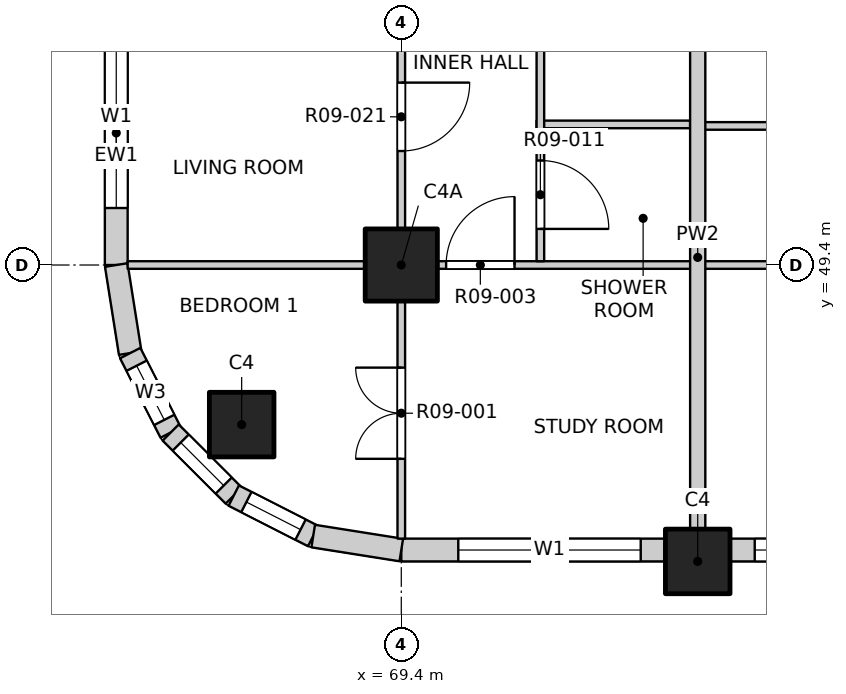
"""IFC4 building model, lengths in metres.
Left out: names, types, materials, properties, quantities, classifications, styles, units other than length and angle.
Written with IfcOpenShell. Run it as: python <this file> out.ifc"""

import sys

from ifc_helpers import new_model, si_unit, direction, frame, frame_2d, origin, origin_2d, place, context, subcontext, project, spatial, rectangle, extrude, element, fill, save


model = new_model("IFC4")
c1 = context("Model", 3, precision=1e-05, world=origin(), true_north=direction((0.0, 1.0)))
c2 = subcontext(c1, "Body", "Model", "MODEL_VIEW")
j1 = project(units=[si_unit("LENGTHUNIT", "METRE"), si_unit("PLANEANGLEUNIT", "RADIAN")], contexts=[c1])
p1 = place(None, origin())
s1 = spatial("IfcSite", under=j1, at=p1, CompositionType="ELEMENT")
p2 = place(p1, origin())
s2 = spatial("IfcBuilding", under=s1, at=p2, CompositionType="ELEMENT")
p3 = place(p2, frame((0.0, 0.0, 110.1)))
s3 = spatial("IfcBuildingStorey", under=s2, at=p3, CompositionType="ELEMENT", Elevation=110.1)
for number, where, z_axis, x_axis in (
    (1, (67.3, 47.3, -0.25), (0.0, 0.0, 1.0), (1.0, 0.0, 0.0)),
    (2, (73.3, 45.5, -0.25), (0.0, 0.0, 1.0), (1.0, 0.0, 0.0)),
):
    element("IfcColumn", number, at=place(p3, frame(where, z_axis=z_axis, x_axis=x_axis)), inside=s3, PredefinedType="COLUMN", context=c2, shape_type="SweptSolid", body=[
        extrude(rectangle(XDim=0.85, YDim=0.85, at=origin_2d()), origin(), (0.0, 0.0, 1.0), 3.4),
    ])
p4 = place(p3, frame((69.4, 49.4, -0.25), z_axis=(0.0, 0.0, 1.0), x_axis=(1.0, 0.0, 0.0)))
e3 = element("IfcColumn", 3, at=p4, inside=s3, PredefinedType="COLUMN", context=c2, shape_type="SweptSolid", body=[
    extrude(rectangle(XDim=0.95, YDim=0.95, at=origin_2d()), origin(), (0.0, 0.0, 1.0), 3.4),
])
p5 = place(p3, frame((69.4, 45.65, 0.0), z_axis=(0.0, 0.0, 1.0), x_axis=(1.0, 0.0, 0.0)))
e4 = element("IfcWall", 4, at=p5, inside=s3, PredefinedType="SOLIDWALL", context=c2, shape_type="SweptSolid", body=[
    extrude(rectangle(XDim=3.475, YDim=0.3, at=frame_2d((1.738, 0.0))), origin(), (0.0, 0.0, 1.0), 2.7),
])
p6 = place(p5, frame((0.75, 0.0, 0.9)))
e5 = element("IfcOpeningElement", 5, at=p6, cuts=e4, PredefinedType="OPENING", context=c2, shape_type="SweptSolid", body=[
    extrude(rectangle(XDim=2.4, YDim=1.8, at=frame_2d((1.2, 0.9))), frame((0.0, 0.16, 0.0), z_axis=(0.0, -1.0, 0.0), x_axis=(1.0, 0.0, 0.0)), (0.0, 0.0, 1.0), 0.32),
])
p7 = place(p3, frame((73.725, 45.65, 0.0), z_axis=(0.0, 0.0, 1.0), x_axis=(1.0, 0.0, 0.0)))
e6 = element("IfcWall", 6, at=p7, inside=s3, PredefinedType="SOLIDWALL", context=c2, shape_type="SweptSolid", body=[
    extrude(rectangle(XDim=6.95, YDim=0.3, at=frame_2d((3.475, 0.0))), origin(), (0.0, 0.0, 1.0), 2.7),
])
p8 = place(p7, frame((0.325, 0.0, 0.9)))
e7 = element("IfcOpeningElement", 7, at=p8, cuts=e6, PredefinedType="OPENING", context=c2, shape_type="SweptSolid", body=[
    extrude(rectangle(XDim=2.4, YDim=1.8, at=frame_2d((1.2, 0.9))), frame((0.0, 0.16, 0.0), z_axis=(0.0, -1.0, 0.0), x_axis=(1.0, 0.0, 0.0)), (0.0, 0.0, 1.0), 0.32),
])
p9 = place(p7, frame((4.225, 0.0, 0.9)))
e8 = element("IfcOpeningElement", 8, at=p9, cuts=e6, PredefinedType="OPENING", context=c2, shape_type="SweptSolid", body=[
    extrude(rectangle(XDim=2.4, YDim=1.8, at=frame_2d((1.2, 0.9))), frame((0.0, 0.16, 0.0), z_axis=(0.0, -1.0, 0.0), x_axis=(1.0, 0.0, 0.0)), (0.0, 0.0, 1.0), 0.32),
])
p10 = place(p3, frame((65.65, 49.4, 0.0), z_axis=(0.0, 0.0, 1.0), x_axis=(0.0, 1.0, 0.0)))
e9 = element("IfcWall", 9, at=p10, inside=s3, PredefinedType="SOLIDWALL", context=c2, shape_type="SweptSolid", body=[
    extrude(rectangle(XDim=3.475, YDim=0.3, at=frame_2d((1.738, 0.0))), origin(), (0.0, 0.0, 1.0), 2.7),
])
p11 = place(p10, frame((0.75, 0.0, 0.9)))
e10 = element("IfcOpeningElement", 10, at=p11, cuts=e9, PredefinedType="OPENING", context=c2, shape_type="SweptSolid", body=[
    extrude(rectangle(XDim=2.4, YDim=1.8, at=frame_2d((1.2, 0.9))), frame((0.0, 0.16, 0.0), z_axis=(0.0, -1.0, 0.0), x_axis=(1.0, 0.0, 0.0)), (0.0, 0.0, 1.0), 0.32),
])
p12 = place(p3, frame((65.65, 49.4, 0.0), z_axis=(0.0, 0.0, 1.0), x_axis=(0.156496880861, -0.987678452879, 0.0)))
e11 = element("IfcWall", 11, at=p12, inside=s3, PredefinedType="SOLIDWALL", context=c2, shape_type="SweptSolid", body=[
    extrude(rectangle(XDim=1.173, YDim=0.3, at=frame_2d((0.586, 0.0))), origin(), (0.0, 0.0, 1.0), 2.7),
])
p13 = place(p3, frame((65.833, 48.241, 0.0), z_axis=(0.0, 0.0, 1.0), x_axis=(0.454025524128, -0.890988677504, 0.0)))
e12 = element("IfcWall", 12, at=p13, inside=s3, PredefinedType="SOLIDWALL", context=c2, shape_type="SweptSolid", body=[
    extrude(rectangle(XDim=1.173, YDim=0.3, at=frame_2d((0.587, 0.0))), origin(), (0.0, 0.0, 1.0), 2.7),
])
p14 = place(p13, frame((0.187, 0.0, 0.9)))
e13 = element("IfcOpeningElement", 13, at=p14, cuts=e12, PredefinedType="OPENING", context=c2, shape_type="SweptSolid", body=[
    extrude(rectangle(XDim=0.8, YDim=1.2, at=frame_2d((0.4, 0.6))), frame((0.0, 0.16, 0.0), z_axis=(0.0, -1.0, 0.0), x_axis=(1.0, 0.0, 0.0)), (0.0, 0.0, 1.0), 0.32),
])
p15 = place(p3, frame((66.366, 47.196, 0.0), z_axis=(0.0, 0.0, 1.0), x_axis=(0.707106781187, -0.707106781187, 0.0)))
e14 = element("IfcWall", 14, at=p15, inside=s3, PredefinedType="SOLIDWALL", context=c2, shape_type="SweptSolid", body=[
    extrude(rectangle(XDim=1.173, YDim=0.3, at=frame_2d((0.586, 0.0))), origin(), (0.0, 0.0, 1.0), 2.7),
])
p16 = place(p15, frame((0.187, 0.0, 0.9)))
e15 = element("IfcOpeningElement", 15, at=p16, cuts=e14, PredefinedType="OPENING", context=c2, shape_type="SweptSolid", body=[
    extrude(rectangle(XDim=0.8, YDim=1.2, at=frame_2d((0.4, 0.6))), frame((0.0, 0.16, 0.0), z_axis=(0.0, -1.0, 0.0), x_axis=(1.0, 0.0, 0.0)), (0.0, 0.0, 1.0), 0.32),
])
p17 = place(p3, frame((67.196, 46.366, 0.0), z_axis=(0.0, 0.0, 1.0), x_axis=(0.890988677504, -0.454025524128, 0.0)))
e16 = element("IfcWall", 16, at=p17, inside=s3, PredefinedType="SOLIDWALL", context=c2, shape_type="SweptSolid", body=[
    extrude(rectangle(XDim=1.173, YDim=0.3, at=frame_2d((0.587, 0.0))), origin(), (0.0, 0.0, 1.0), 2.7),
])
p18 = place(p17, frame((0.187, 0.0, 0.9)))
e17 = element("IfcOpeningElement", 17, at=p18, cuts=e16, PredefinedType="OPENING", context=c2, shape_type="SweptSolid", body=[
    extrude(rectangle(XDim=0.8, YDim=1.2, at=frame_2d((0.4, 0.6))), frame((0.0, 0.16, 0.0), z_axis=(0.0, -1.0, 0.0), x_axis=(1.0, 0.0, 0.0)), (0.0, 0.0, 1.0), 0.32),
])
p19 = place(p3, frame((68.241, 45.833, 0.0), z_axis=(0.0, 0.0, 1.0), x_axis=(0.987678452879, -0.156496880861, 0.0)))
e18 = element("IfcWall", 18, at=p19, inside=s3, PredefinedType="SOLIDWALL", context=c2, shape_type="SweptSolid", body=[
    extrude(rectangle(XDim=1.173, YDim=0.3, at=frame_2d((0.586, 0.0))), origin(), (0.0, 0.0, 1.0), 2.7),
])
p20 = place(p3, frame((65.8, 49.4, 0.0), z_axis=(0.0, 0.0, 1.0), x_axis=(1.0, 0.0, 0.0)))
e19 = element("IfcWall", 19, at=p20, inside=s3, PredefinedType="PARTITIONING", context=c2, shape_type="SweptSolid", body=[
    extrude(rectangle(XDim=38.4, YDim=0.1, at=frame_2d((19.2, 0.0))), origin(), (0.0, 0.0, 1.0), 3.15),
])
p21 = place(p20, frame((4.19, 0.0, 0.0)))
e20 = element("IfcOpeningElement", 20, at=p21, cuts=e19, PredefinedType="OPENING", context=c2, shape_type="SweptSolid", body=[
    extrude(rectangle(XDim=0.9, YDim=2.1, at=frame_2d((0.45, 1.05))), frame((0.0, 0.06, 0.0), z_axis=(0.0, -1.0, 0.0), x_axis=(1.0, 0.0, 0.0)), (0.0, 0.0, 1.0), 0.12),
])
p22 = place(p20, frame((9.0, 0.0, 0.0)))
e21 = element("IfcOpeningElement", 21, at=p22, cuts=e19, PredefinedType="OPENING", context=c2, shape_type="SweptSolid", body=[
    extrude(rectangle(XDim=0.9, YDim=2.1, at=frame_2d((0.45, 1.05))), frame((0.0, 0.06, 0.0), z_axis=(0.0, -1.0, 0.0), x_axis=(1.0, 0.0, 0.0)), (0.0, 0.0, 1.0), 0.12),
])
p23 = place(p20, frame((12.9, 0.0, 0.0)))
e22 = element("IfcOpeningElement", 22, at=p23, cuts=e19, PredefinedType="OPENING", context=c2, shape_type="SweptSolid", body=[
    extrude(rectangle(XDim=0.9, YDim=2.1, at=frame_2d((0.45, 1.05))), frame((0.0, 0.06, 0.0), z_axis=(0.0, -1.0, 0.0), x_axis=(1.0, 0.0, 0.0)), (0.0, 0.0, 1.0), 0.12),
])
p24 = place(p20, frame((16.8, 0.0, 0.0)))
e23 = element("IfcOpeningElement", 23, at=p24, cuts=e19, PredefinedType="OPENING", context=c2, shape_type="SweptSolid", body=[
    extrude(rectangle(XDim=0.9, YDim=2.1, at=frame_2d((0.45, 1.05))), frame((0.0, 0.06, 0.0), z_axis=(0.0, -1.0, 0.0), x_axis=(1.0, 0.0, 0.0)), (0.0, 0.0, 1.0), 0.12),
])
p25 = place(p20, frame((20.7, 0.0, 0.0)))
e24 = element("IfcOpeningElement", 24, at=p25, cuts=e19, PredefinedType="OPENING", context=c2, shape_type="SweptSolid", body=[
    extrude(rectangle(XDim=0.9, YDim=2.1, at=frame_2d((0.45, 1.05))), frame((0.0, 0.06, 0.0), z_axis=(0.0, -1.0, 0.0), x_axis=(1.0, 0.0, 0.0)), (0.0, 0.0, 1.0), 0.12),
])
p26 = place(p20, frame((24.6, 0.0, 0.0)))
e25 = element("IfcOpeningElement", 25, at=p26, cuts=e19, PredefinedType="OPENING", context=c2, shape_type="SweptSolid", body=[
    extrude(rectangle(XDim=0.9, YDim=2.1, at=frame_2d((0.45, 1.05))), frame((0.0, 0.06, 0.0), z_axis=(0.0, -1.0, 0.0), x_axis=(1.0, 0.0, 0.0)), (0.0, 0.0, 1.0), 0.12),
])
p27 = place(p20, frame((28.5, 0.0, 0.0)))
e26 = element("IfcOpeningElement", 26, at=p27, cuts=e19, PredefinedType="OPENING", context=c2, shape_type="SweptSolid", body=[
    extrude(rectangle(XDim=0.9, YDim=2.1, at=frame_2d((0.45, 1.05))), frame((0.0, 0.06, 0.0), z_axis=(0.0, -1.0, 0.0), x_axis=(1.0, 0.0, 0.0)), (0.0, 0.0, 1.0), 0.12),
])
p28 = place(p20, frame((33.31, 0.0, 0.0)))
e27 = element("IfcOpeningElement", 27, at=p28, cuts=e19, PredefinedType="OPENING", context=c2, shape_type="SweptSolid", body=[
    extrude(rectangle(XDim=0.9, YDim=2.1, at=frame_2d((0.45, 1.05))), frame((0.0, 0.06, 0.0), z_axis=(0.0, -1.0, 0.0), x_axis=(1.0, 0.0, 0.0)), (0.0, 0.0, 1.0), 0.12),
])
p29 = place(p3, frame((73.2, 51.23, 0.0), z_axis=(0.0, 0.0, 1.0), x_axis=(1.0, 0.0, 0.0)))
e28 = element("IfcWall", 28, at=p29, inside=s3, PredefinedType="PARTITIONING", context=c2, shape_type="SweptSolid", body=[
    extrude(rectangle(XDim=9.15, YDim=0.1, at=frame_2d((4.575, 0.0))), origin(), (0.0, 0.0, 1.0), 3.15),
])
p30 = place(p29, frame((1.41, 0.0, 0.0)))
e29 = element("IfcOpeningElement", 29, at=p30, cuts=e28, PredefinedType="OPENING", context=c2, shape_type="SweptSolid", body=[
    extrude(rectangle(XDim=0.9, YDim=2.1, at=frame_2d((0.45, 1.05))), frame((0.0, 0.06, 0.0), z_axis=(0.0, -1.0, 0.0), x_axis=(1.0, 0.0, 0.0)), (0.0, 0.0, 1.0), 0.12),
])
p31 = place(p29, frame((4.76, 0.0, 0.0)))
e30 = element("IfcOpeningElement", 30, at=p31, cuts=e28, PredefinedType="OPENING", context=c2, shape_type="SweptSolid", body=[
    extrude(rectangle(XDim=0.8, YDim=2.1, at=frame_2d((0.4, 1.05))), frame((0.0, 0.06, 0.0), z_axis=(0.0, -1.0, 0.0), x_axis=(1.0, 0.0, 0.0)), (0.0, 0.0, 1.0), 0.12),
])
p32 = place(p29, frame((7.45, 0.0, 0.0)))
e31 = element("IfcOpeningElement", 31, at=p32, cuts=e28, PredefinedType="OPENING", context=c2, shape_type="SweptSolid", body=[
    extrude(rectangle(XDim=0.9, YDim=2.1, at=frame_2d((0.45, 1.05))), frame((0.0, 0.06, 0.0), z_axis=(0.0, -1.0, 0.0), x_axis=(1.0, 0.0, 0.0)), (0.0, 0.0, 1.0), 0.12),
])
p33 = place(p3, frame((71.18, 51.25, 0.0), z_axis=(0.0, 0.0, 1.0), x_axis=(1.0, 0.0, 0.0)))
e32 = element("IfcWall", 32, at=p33, inside=s3, PredefinedType="PARTITIONING", context=c2, shape_type="SweptSolid", body=[
    extrude(rectangle(XDim=2.02, YDim=0.1, at=frame_2d((1.01, 0.0))), origin(), (0.0, 0.0, 1.0), 3.15),
])
p34 = place(p3, frame((69.4, 45.8, 0.0), z_axis=(0.0, 0.0, 1.0), x_axis=(0.0, 1.0, 0.0)))
e33 = element("IfcWall", 33, at=p34, inside=s3, PredefinedType="PARTITIONING", context=c2, shape_type="SweptSolid", body=[
    extrude(rectangle(XDim=38.4, YDim=0.1, at=frame_2d((19.2, 0.0))), origin(), (0.0, 0.0, 1.0), 3.15),
])
p35 = place(p34, frame((1.05, 0.0, 0.0)))
e34 = element("IfcOpeningElement", 34, at=p35, cuts=e33, PredefinedType="OPENING", context=c2, shape_type="SweptSolid", body=[
    extrude(rectangle(XDim=1.2, YDim=2.1, at=frame_2d((0.6, 1.05))), frame((0.0, 0.06, 0.0), z_axis=(0.0, -1.0, 0.0), x_axis=(1.0, 0.0, 0.0)), (0.0, 0.0, 1.0), 0.12),
])
p36 = place(p34, frame((5.1, 0.0, 0.0)))
e35 = element("IfcOpeningElement", 35, at=p36, cuts=e33, PredefinedType="OPENING", context=c2, shape_type="SweptSolid", body=[
    extrude(rectangle(XDim=0.9, YDim=2.1, at=frame_2d((0.45, 1.05))), frame((0.0, 0.06, 0.0), z_axis=(0.0, -1.0, 0.0), x_axis=(1.0, 0.0, 0.0)), (0.0, 0.0, 1.0), 0.12),
])
p37 = place(p34, frame((9.0, 0.0, 0.0)))
e36 = element("IfcOpeningElement", 36, at=p37, cuts=e33, PredefinedType="OPENING", context=c2, shape_type="SweptSolid", body=[
    extrude(rectangle(XDim=0.9, YDim=2.1, at=frame_2d((0.45, 1.05))), frame((0.0, 0.06, 0.0), z_axis=(0.0, -1.0, 0.0), x_axis=(1.0, 0.0, 0.0)), (0.0, 0.0, 1.0), 0.12),
])
p38 = place(p34, frame((12.9, 0.0, 0.0)))
e37 = element("IfcOpeningElement", 37, at=p38, cuts=e33, PredefinedType="OPENING", context=c2, shape_type="SweptSolid", body=[
    extrude(rectangle(XDim=0.9, YDim=2.1, at=frame_2d((0.45, 1.05))), frame((0.0, 0.06, 0.0), z_axis=(0.0, -1.0, 0.0), x_axis=(1.0, 0.0, 0.0)), (0.0, 0.0, 1.0), 0.12),
])
p39 = place(p34, frame((16.8, 0.0, 0.0)))
e38 = element("IfcOpeningElement", 38, at=p39, cuts=e33, PredefinedType="OPENING", context=c2, shape_type="SweptSolid", body=[
    extrude(rectangle(XDim=0.9, YDim=2.1, at=frame_2d((0.45, 1.05))), frame((0.0, 0.06, 0.0), z_axis=(0.0, -1.0, 0.0), x_axis=(1.0, 0.0, 0.0)), (0.0, 0.0, 1.0), 0.12),
])
p40 = place(p34, frame((20.7, 0.0, 0.0)))
e39 = element("IfcOpeningElement", 39, at=p40, cuts=e33, PredefinedType="OPENING", context=c2, shape_type="SweptSolid", body=[
    extrude(rectangle(XDim=0.9, YDim=2.1, at=frame_2d((0.45, 1.05))), frame((0.0, 0.06, 0.0), z_axis=(0.0, -1.0, 0.0), x_axis=(1.0, 0.0, 0.0)), (0.0, 0.0, 1.0), 0.12),
])
p41 = place(p34, frame((24.6, 0.0, 0.0)))
e40 = element("IfcOpeningElement", 40, at=p41, cuts=e33, PredefinedType="OPENING", context=c2, shape_type="SweptSolid", body=[
    extrude(rectangle(XDim=0.9, YDim=2.1, at=frame_2d((0.45, 1.05))), frame((0.0, 0.06, 0.0), z_axis=(0.0, -1.0, 0.0), x_axis=(1.0, 0.0, 0.0)), (0.0, 0.0, 1.0), 0.12),
])
p42 = place(p34, frame((28.5, 0.0, 0.0)))
e41 = element("IfcOpeningElement", 41, at=p42, cuts=e33, PredefinedType="OPENING", context=c2, shape_type="SweptSolid", body=[
    extrude(rectangle(XDim=0.9, YDim=2.1, at=frame_2d((0.45, 1.05))), frame((0.0, 0.06, 0.0), z_axis=(0.0, -1.0, 0.0), x_axis=(1.0, 0.0, 0.0)), (0.0, 0.0, 1.0), 0.12),
])
p43 = place(p34, frame((32.4, 0.0, 0.0)))
e42 = element("IfcOpeningElement", 42, at=p43, cuts=e33, PredefinedType="OPENING", context=c2, shape_type="SweptSolid", body=[
    extrude(rectangle(XDim=0.9, YDim=2.1, at=frame_2d((0.45, 1.05))), frame((0.0, 0.06, 0.0), z_axis=(0.0, -1.0, 0.0), x_axis=(1.0, 0.0, 0.0)), (0.0, 0.0, 1.0), 0.12),
])
p44 = place(p34, frame((36.15, 0.0, 0.0)))
e43 = element("IfcOpeningElement", 43, at=p44, cuts=e33, PredefinedType="OPENING", context=c2, shape_type="SweptSolid", body=[
    extrude(rectangle(XDim=1.2, YDim=2.1, at=frame_2d((0.6, 1.05))), frame((0.0, 0.06, 0.0), z_axis=(0.0, -1.0, 0.0), x_axis=(1.0, 0.0, 0.0)), (0.0, 0.0, 1.0), 0.12),
])
p45 = place(p3, frame((71.23, 49.45, 0.0), z_axis=(0.0, 0.0, 1.0), x_axis=(0.0, 1.0, 0.0)))
e44 = element("IfcWall", 44, at=p45, inside=s3, PredefinedType="PARTITIONING", context=c2, shape_type="SweptSolid", body=[
    extrude(rectangle(XDim=4.65, YDim=0.1, at=frame_2d((2.325, 0.0))), origin(), (0.0, 0.0, 1.0), 3.15),
])
p46 = place(p45, frame((0.425, 0.0, 0.0)))
e45 = element("IfcOpeningElement", 45, at=p46, cuts=e44, PredefinedType="OPENING", context=c2, shape_type="SweptSolid", body=[
    extrude(rectangle(XDim=0.9, YDim=2.1, at=frame_2d((0.45, 1.05))), frame((0.0, 0.06, 0.0), z_axis=(0.0, -1.0, 0.0), x_axis=(1.0, 0.0, 0.0)), (0.0, 0.0, 1.0), 0.12),
])
p47 = place(p45, frame((2.85, 0.0, 0.0)))
e46 = element("IfcOpeningElement", 46, at=p47, cuts=e44, PredefinedType="OPENING", context=c2, shape_type="SweptSolid", body=[
    extrude(rectangle(XDim=0.8, YDim=2.1, at=frame_2d((0.4, 1.05))), frame((0.0, 0.06, 0.0), z_axis=(0.0, -1.0, 0.0), x_axis=(1.0, 0.0, 0.0)), (0.0, 0.0, 1.0), 0.12),
])
p48 = place(p3, frame((73.3, 45.8, 0.0), z_axis=(0.0, 0.0, 1.0), x_axis=(0.0, 1.0, 0.0)))
e47 = element("IfcWall", 47, at=p48, inside=s3, PredefinedType="PARTITIONING", context=c2, shape_type="SweptSolid", body=[
    extrude(rectangle(XDim=7.4, YDim=0.2, at=frame_2d((3.7, 0.0))), origin(), (0.0, 0.0, 1.0), 3.15),
])
p49 = place(p6, origin())
e48 = element("IfcWindow", 48, at=p49, inside=s3, PartitioningType="DOUBLE_PANEL_VERTICAL", PredefinedType="WINDOW", context=c2, shape_type="SweptSolid", body=[
    extrude(rectangle(XDim=2.4, YDim=1.8, at=frame_2d((1.2, 0.9))), frame((0.0, 0.03, 0.0), z_axis=(0.0, -1.0, 0.0), x_axis=(1.0, 0.0, 0.0)), (0.0, 0.0, 1.0), 0.06),
])
fill(e5, e48)
p50 = place(p8, origin())
e49 = element("IfcWindow", 49, at=p50, inside=s3, PartitioningType="DOUBLE_PANEL_VERTICAL", PredefinedType="WINDOW", context=c2, shape_type="SweptSolid", body=[
    extrude(rectangle(XDim=2.4, YDim=1.8, at=frame_2d((1.2, 0.9))), frame((0.0, 0.03, 0.0), z_axis=(0.0, -1.0, 0.0), x_axis=(1.0, 0.0, 0.0)), (0.0, 0.0, 1.0), 0.06),
])
fill(e7, e49)
p51 = place(p11, origin())
e50 = element("IfcWindow", 50, at=p51, inside=s3, PartitioningType="DOUBLE_PANEL_VERTICAL", PredefinedType="WINDOW", context=c2, shape_type="SweptSolid", body=[
    extrude(rectangle(XDim=2.4, YDim=1.8, at=frame_2d((1.2, 0.9))), frame((0.0, 0.03, 0.0), z_axis=(0.0, -1.0, 0.0), x_axis=(1.0, 0.0, 0.0)), (0.0, 0.0, 1.0), 0.06),
])
fill(e10, e50)
p52 = place(p14, origin())
e51 = element("IfcWindow", 51, at=p52, inside=s3, PartitioningType="SINGLE_PANEL", PredefinedType="WINDOW", context=c2, shape_type="SweptSolid", body=[
    extrude(rectangle(XDim=0.8, YDim=1.2, at=frame_2d((0.4, 0.6))), frame((0.0, 0.03, 0.0), z_axis=(0.0, -1.0, 0.0), x_axis=(1.0, 0.0, 0.0)), (0.0, 0.0, 1.0), 0.06),
])
fill(e13, e51)
p53 = place(p16, origin())
e52 = element("IfcWindow", 52, at=p53, inside=s3, PartitioningType="SINGLE_PANEL", PredefinedType="WINDOW", context=c2, shape_type="SweptSolid", body=[
    extrude(rectangle(XDim=0.8, YDim=1.2, at=frame_2d((0.4, 0.6))), frame((0.0, 0.03, 0.0), z_axis=(0.0, -1.0, 0.0), x_axis=(1.0, 0.0, 0.0)), (0.0, 0.0, 1.0), 0.06),
])
fill(e15, e52)
p54 = place(p18, origin())
e53 = element("IfcWindow", 53, at=p54, inside=s3, PartitioningType="SINGLE_PANEL", PredefinedType="WINDOW", context=c2, shape_type="SweptSolid", body=[
    extrude(rectangle(XDim=0.8, YDim=1.2, at=frame_2d((0.4, 0.6))), frame((0.0, 0.03, 0.0), z_axis=(0.0, -1.0, 0.0), x_axis=(1.0, 0.0, 0.0)), (0.0, 0.0, 1.0), 0.06),
])
fill(e17, e53)
p55 = place(p35, origin())
e54 = element("IfcDoor", 54, at=p55, inside=s3, OperationType="DOUBLE_DOOR_SINGLE_SWING", PredefinedType="DOOR", context=c2, shape_type="SweptSolid", body=[
    extrude(rectangle(XDim=1.2, YDim=2.1, at=frame_2d((0.6, 1.05))), frame((0.0, 0.025, 0.0), z_axis=(0.0, -1.0, 0.0), x_axis=(1.0, 0.0, 0.0)), (0.0, 0.0, 1.0), 0.05),
])
fill(e34, e54)
p56 = place(p21, origin())
e55 = element("IfcDoor", 55, at=p56, inside=s3, OperationType="SINGLE_SWING_RIGHT", PredefinedType="DOOR", context=c2, shape_type="SweptSolid", body=[
    extrude(rectangle(XDim=0.9, YDim=2.1, at=frame_2d((0.45, 1.05))), frame((0.0, 0.025, 0.0), z_axis=(0.0, -1.0, 0.0), x_axis=(1.0, 0.0, 0.0)), (0.0, 0.0, 1.0), 0.05),
])
fill(e20, e55)
p57 = place(p46, origin())
e56 = element("IfcDoor", 56, at=p57, inside=s3, OperationType="SINGLE_SWING_RIGHT", PredefinedType="DOOR", context=c2, shape_type="SweptSolid", body=[
    extrude(rectangle(XDim=0.9, YDim=2.1, at=frame_2d((0.45, 1.05))), frame((0.0, 0.025, 0.0), z_axis=(0.0, -1.0, 0.0), x_axis=(1.0, 0.0, 0.0)), (0.0, 0.0, 1.0), 0.05),
])
fill(e45, e56)
p58 = place(p36, origin())
e57 = element("IfcDoor", 57, at=p58, inside=s3, OperationType="SINGLE_SWING_LEFT", PredefinedType="DOOR", context=c2, shape_type="SweptSolid", body=[
    extrude(rectangle(XDim=0.9, YDim=2.1, at=frame_2d((0.45, 1.05))), frame((0.0, 0.025, 0.0), z_axis=(0.0, -1.0, 0.0), x_axis=(1.0, 0.0, 0.0)), (0.0, 0.0, 1.0), 0.05),
])
fill(e35, e57)
save(model, sys.argv[1])
